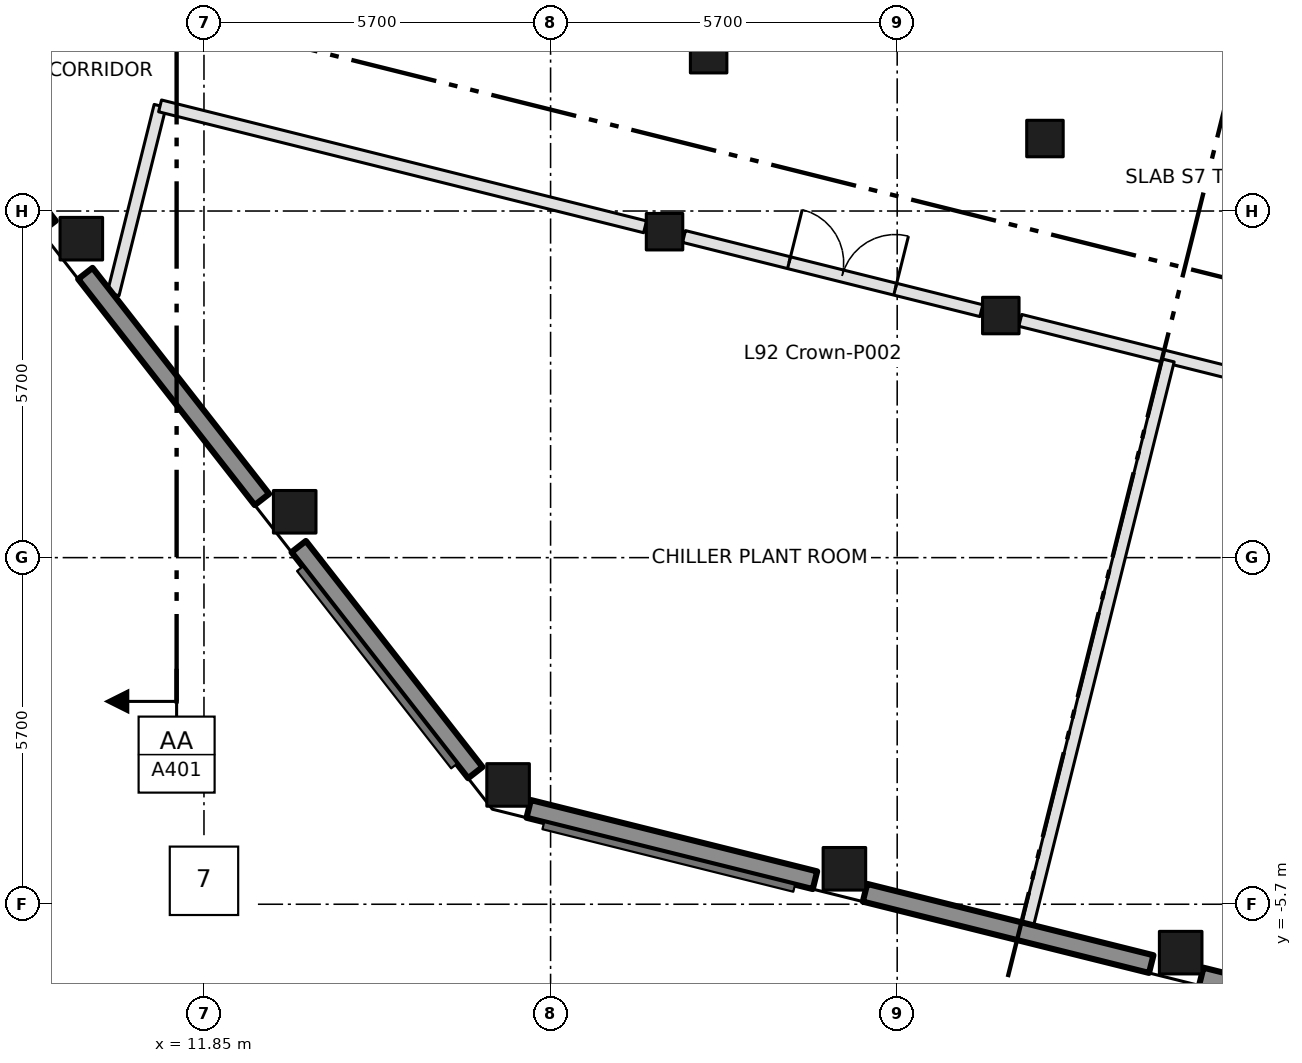
"""IFC4 building model, lengths in metres.
Left out: names, types, materials, properties, quantities, classifications, styles, units other than length and angle.
Written with IfcOpenShell. Run it as: python <this file> out.ifc"""

import sys

from ifc_helpers import new_model, si_unit, direction, frame, frame_2d, origin, origin_2d, place, context, subcontext, project, spatial, rectangle, extrude, element, fill, save


model = new_model("IFC4")
c1 = context("Model", 3, precision=1e-05, world=origin(), true_north=direction((0.0, 1.0)))
c2 = subcontext(c1, "Body", "Model", "MODEL_VIEW")
j1 = project(units=[si_unit("LENGTHUNIT", "METRE"), si_unit("PLANEANGLEUNIT", "RADIAN")], contexts=[c1])
p1 = place(None, origin())
s1 = spatial("IfcSite", under=j1, at=p1, CompositionType="ELEMENT")
p2 = place(p1, origin())
s2 = spatial("IfcBuilding", under=s1, at=p2, CompositionType="ELEMENT")
p3 = place(p2, frame((0.0, 0.0, 400.2)))
s3 = spatial("IfcBuildingStorey", under=s2, at=p3, CompositionType="ELEMENT", Elevation=400.2)
for number, where, z_axis, x_axis in (
    (1, (16.851, -3.738, 0.0), (0.0, 0.0, 1.0), (1.0, 0.0, 0.0)),
    (2, (13.342, 0.754, 0.0), (0.0, 0.0, 1.0), (1.0, 0.0, 0.0)),
    (3, (9.833, 5.245, 0.0), (0.0, 0.0, 1.0), (1.0, 0.0, 0.0)),
    (4, (22.382, -5.117, 0.0), (0.0, 0.0, 1.0), (1.0, 0.0, 0.0)),
    (5, (27.912, -6.496, 0.0), (0.0, 0.0, 1.0), (1.0, 0.0, 0.0)),
):
    element("IfcColumn", number, at=place(p3, frame(where, z_axis=z_axis, x_axis=x_axis)), inside=s3, PredefinedType="COLUMN", context=c2, shape_type="SweptSolid", body=[
        extrude(rectangle(XDim=0.7, YDim=0.7, at=origin_2d()), origin(), (0.0, 0.0, 1.0), 4.8),
    ])
for number, where, z_axis, x_axis in (
    (6, (19.424, 5.36, 0.0), (0.0, 0.0, 1.0), (1.0, 0.0, 0.0)),
    (7, (24.954, 3.981, 0.0), (0.0, 0.0, 1.0), (1.0, 0.0, 0.0)),
    (8, (20.149, 8.271, 0.0), (0.0, 0.0, 1.0), (1.0, 0.0, 0.0)),
    (9, (25.68, 6.892, 0.0), (0.0, 0.0, 1.0), (1.0, 0.0, 0.0)),
):
    element("IfcColumn", number, at=place(p3, frame(where, z_axis=z_axis, x_axis=x_axis)), inside=s3, PredefinedType="COLUMN", context=c2, shape_type="SweptSolid", body=[
        extrude(rectangle(XDim=0.6, YDim=0.6, at=origin_2d()), origin(), (0.0, 0.0, 1.0), 4.8),
    ])
p4 = place(p3, frame((10.356, 4.332, 0.0), z_axis=(0.0, 0.0, 1.0), x_axis=(0.241869632235, 0.970308755501, 0.0)))
e10 = element("IfcWall", 10, at=p4, inside=s3, PredefinedType="PARTITIONING", context=c2, shape_type="SweptSolid", body=[
    extrude(rectangle(XDim=3.192, YDim=0.2, at=frame_2d((1.596, 0.0))), origin(), (0.0, 0.0, 1.0), 4.5),
])
p5 = place(p3, frame((11.128, 7.429, 0.0), z_axis=(0.0, 0.0, 1.0), x_axis=(0.970285587756, -0.241962555355, 0.0)))
e11 = element("IfcWall", 11, at=p5, inside=s3, PredefinedType="PARTITIONING", context=c2, shape_type="SweptSolid", body=[
    extrude(rectangle(XDim=8.22, YDim=0.2, at=frame_2d((4.11, 0.0))), origin(), (0.0, 0.0, 1.0), 4.5),
])
p6 = place(p3, frame((19.744, 5.281, 0.0), z_axis=(0.0, 0.0, 1.0), x_axis=(0.970262058426, -0.242056889963, 0.0)))
e12 = element("IfcWall", 12, at=p6, inside=s3, PredefinedType="PARTITIONING", context=c2, shape_type="SweptSolid", body=[
    extrude(rectangle(XDim=5.04, YDim=0.2, at=frame_2d((2.52, 0.0))), origin(), (0.0, 0.0, 1.0), 4.5),
])
p7 = place(p6, frame((1.78, 0.0, 0.0)))
e13 = element("IfcOpeningElement", 13, at=p7, cuts=e12, PredefinedType="OPENING", context=c2, shape_type="SweptSolid", body=[
    extrude(rectangle(XDim=1.8, YDim=2.1, at=frame_2d((0.9, 1.05))), frame((0.0, 0.11, 0.0), z_axis=(0.0, -1.0, 0.0), x_axis=(1.0, 0.0, 0.0)), (0.0, 0.0, 1.0), 0.22),
])
p8 = place(p3, frame((25.274, 3.902, 0.0), z_axis=(0.0, 0.0, 1.0), x_axis=(0.970262034576, -0.242056985565, 0.0)))
e14 = element("IfcWall", 14, at=p8, inside=s3, PredefinedType="PARTITIONING", context=c2, shape_type="SweptSolid", body=[
    extrude(rectangle(XDim=5.041, YDim=0.2, at=frame_2d((2.521, 0.0))), origin(), (0.0, 0.0, 1.0), 4.5),
])
p9 = place(p3, frame((25.397, -6.023, 0.0), z_axis=(0.0, 0.0, 1.0), x_axis=(0.242000222655, 0.97027619379, 0.0)))
e15 = element("IfcWall", 15, at=p9, inside=s3, PredefinedType="PARTITIONING", context=c2, shape_type="SweptSolid", body=[
    extrude(rectangle(XDim=9.55, YDim=0.2, at=frame_2d((4.775, 0.0))), origin(), (0.0, 0.0, 1.0), 4.5),
])
p10 = place(p3, frame((6.389, 9.165, 0.0), z_axis=(0.0, 0.0, 1.0), x_axis=(0.61568721755, -0.7879906409, 0.0)))
e16 = element("IfcWall", 16, at=p10, inside=s3, PredefinedType="SOLIDWALL", context=c2, shape_type="SweptSolid", body=[
    extrude(rectangle(XDim=4.718, YDim=0.3, at=frame_2d((2.359, 0.0))), origin(), (0.0, 0.0, 1.0), 3.85),
])
p11 = place(p3, frame((9.899, 4.673, 0.0), z_axis=(0.0, 0.0, 1.0), x_axis=(0.615659107807, -0.788012603309, 0.0)))
e17 = element("IfcWall", 17, at=p11, inside=s3, PredefinedType="SOLIDWALL", context=c2, shape_type="SweptSolid", body=[
    extrude(rectangle(XDim=4.717, YDim=0.3, at=frame_2d((2.358, 0.0))), origin(), (0.0, 0.0, 1.0), 3.85),
])
p12 = place(p3, frame((13.408, 0.182, 0.0), z_axis=(0.0, 0.0, 1.0), x_axis=(0.61568421867, -0.78799298403, 0.0)))
e18 = element("IfcWall", 18, at=p12, inside=s3, PredefinedType="SOLIDWALL", context=c2, shape_type="SweptSolid", body=[
    extrude(rectangle(XDim=4.717, YDim=0.3, at=frame_2d((2.358, 0.0))), origin(), (0.0, 0.0, 1.0), 3.85),
])
p13 = place(p3, frame((17.19, -4.132, 0.0), z_axis=(0.0, 0.0, 1.0), x_axis=(0.970343440388, -0.241730444287, 0.0)))
e19 = element("IfcWall", 19, at=p13, inside=s3, PredefinedType="SOLIDWALL", context=c2, shape_type="SweptSolid", body=[
    extrude(rectangle(XDim=4.852, YDim=0.3, at=frame_2d((2.426, 0.0))), origin(), (0.0, 0.0, 1.0), 3.85),
])
p14 = place(p3, frame((22.721, -5.511, 0.0), z_axis=(0.0, 0.0, 1.0), x_axis=(0.970319867473, -0.241825049959, 0.0)))
e20 = element("IfcWall", 20, at=p14, inside=s3, PredefinedType="SOLIDWALL", context=c2, shape_type="SweptSolid", body=[
    extrude(rectangle(XDim=4.851, YDim=0.3, at=frame_2d((2.426, 0.0))), origin(), (0.0, 0.0, 1.0), 3.85),
])
p15 = place(p3, frame((28.251, -6.889, 0.0), z_axis=(0.0, 0.0, 1.0), x_axis=(0.970284401049, -0.241967314076, 0.0)))
e21 = element("IfcWall", 21, at=p15, inside=s3, PredefinedType="SOLIDWALL", context=c2, shape_type="SweptSolid", body=[
    extrude(rectangle(XDim=4.852, YDim=0.3, at=frame_2d((2.426, 0.0))), origin(), (0.0, 0.0, 1.0), 3.85),
])
p16 = place(p7, origin())
e22 = element("IfcDoor", 22, at=p16, inside=s3, OperationType="DOUBLE_DOOR_SINGLE_SWING", PredefinedType="DOOR", context=c2, shape_type="SweptSolid", body=[
    extrude(rectangle(XDim=1.8, YDim=2.1, at=frame_2d((0.9, 1.05))), frame((0.0, 0.025, 0.0), z_axis=(0.0, -1.0, 0.0), x_axis=(1.0, 0.0, 0.0)), (0.0, 0.0, 1.0), 0.05),
])
fill(e13, e22)
save(model, sys.argv[1])
